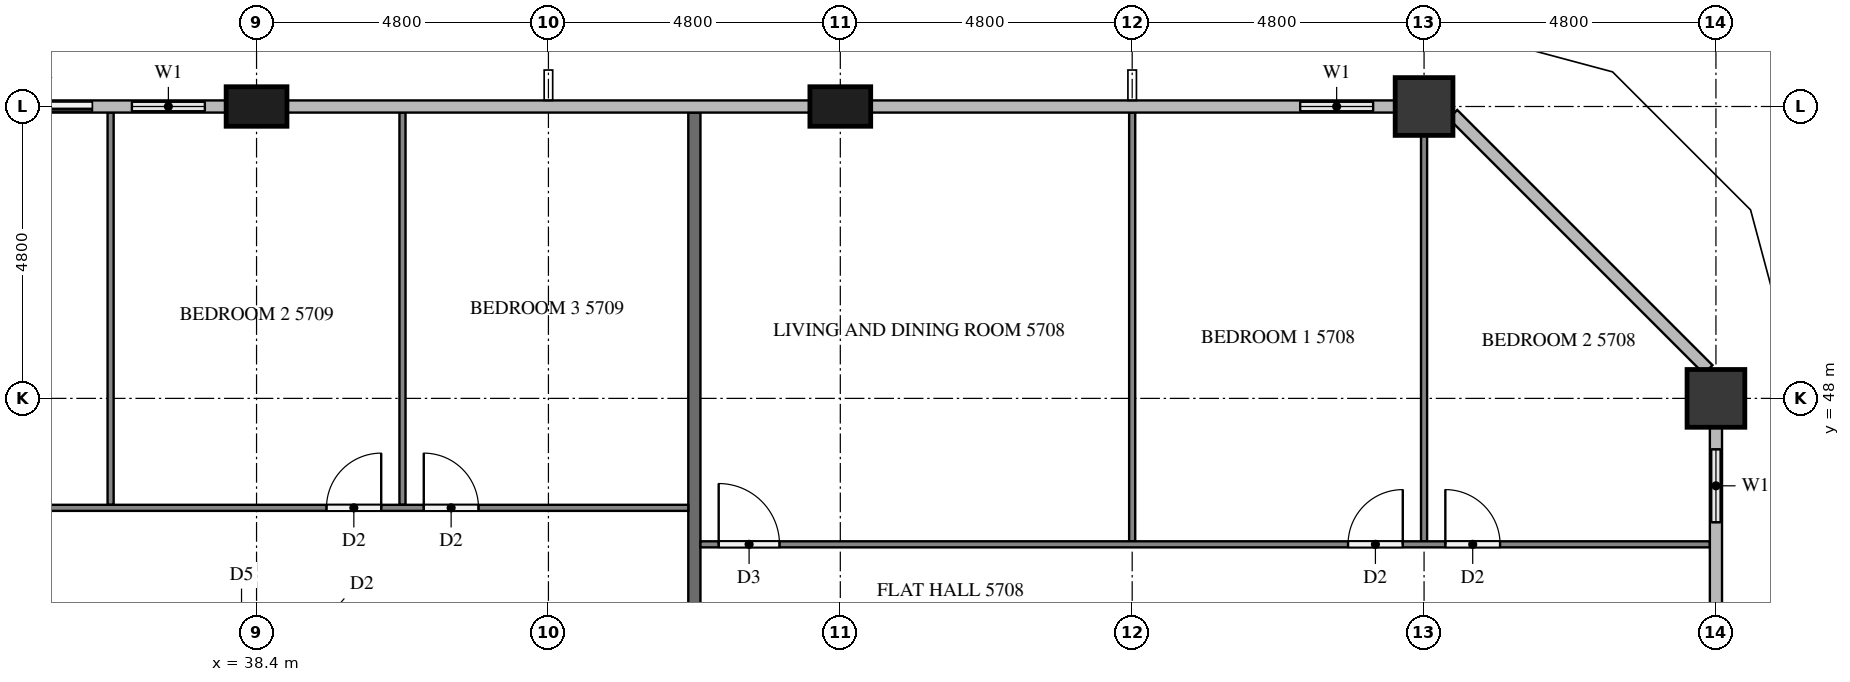
"""IFC4 building model, lengths in metres.
Left out: names, types, materials, properties, quantities, classifications, styles, units other than length and angle.
Written with IfcOpenShell. Run it as: python <this file> out.ifc"""

import sys

from ifc_helpers import new_model, si_unit, direction, frame, frame_2d, origin, origin_2d, place, context, subcontext, project, spatial, rectangle, extrude, element, fill, save


model = new_model("IFC4")
c1 = context("Model", 3, precision=1e-05, world=origin(), true_north=direction((0.0, 1.0)))
c2 = subcontext(c1, "Body", "Model", "MODEL_VIEW")
j1 = project(units=[si_unit("LENGTHUNIT", "METRE"), si_unit("PLANEANGLEUNIT", "RADIAN")], contexts=[c1])
p1 = place(None, origin())
s1 = spatial("IfcSite", under=j1, at=p1, CompositionType="ELEMENT")
p2 = place(p1, origin())
s2 = spatial("IfcBuilding", under=s1, at=p2, CompositionType="ELEMENT")
p3 = place(p2, frame((0.0, 0.0, 219.3)))
s3 = spatial("IfcBuildingStorey", under=s2, at=p3, CompositionType="ELEMENT", Elevation=219.3)
for number, where, z_axis, x_axis in (
    (1, (62.4, 48.0, 0.0), (0.0, 0.0, 1.0), (1.0, 0.0, 0.0)),
    (2, (57.6, 52.8, 0.0), (0.0, 0.0, 1.0), (1.0, 0.0, 0.0)),
):
    element("IfcColumn", number, at=place(p3, frame(where, z_axis=z_axis, x_axis=x_axis)), inside=s3, PredefinedType="COLUMN", context=c2, shape_type="SweptSolid", body=[
        extrude(rectangle(XDim=0.95, YDim=0.95, at=origin_2d()), origin(), (0.0, 0.0, 1.0), 3.2),
    ])
for number, where, z_axis, x_axis in (
    (3, (48.0, 52.8, 0.0), (0.0, 0.0, 1.0), (1.0, 0.0, 0.0)),
    (4, (38.4, 52.8, 0.0), (0.0, 0.0, 1.0), (1.0, 0.0, 0.0)),
):
    element("IfcColumn", number, at=place(p3, frame(where, z_axis=z_axis, x_axis=x_axis)), inside=s3, PredefinedType="COLUMN", context=c2, shape_type="SweptSolid", body=[
        extrude(rectangle(XDim=1.0, YDim=0.65, at=origin_2d()), origin(), (0.0, 0.0, 1.0), 3.2),
    ])
p4 = place(p3, frame((62.4, 45.6, 0.0), z_axis=(0.0, 0.0, 1.0), x_axis=(0.0, 1.0, 0.0)))
e5 = element("IfcWall", 5, at=p4, inside=s3, PredefinedType="SOLIDWALL", context=c2, shape_type="SweptSolid", body=[
    extrude(rectangle(XDim=1.925, YDim=0.15, at=frame_2d((0.962, 0.0))), origin(), (0.0, 0.0, 1.0), 3.2),
])
p5 = place(p4, frame((0.363, 0.0, 0.9)))
e6 = element("IfcOpeningElement", 6, at=p5, cuts=e5, PredefinedType="OPENING", context=c2, shape_type="SweptSolid", body=[
    extrude(rectangle(XDim=1.2, YDim=1.4, at=frame_2d((0.6, 0.7))), frame((0.0, 0.085, 0.0), z_axis=(0.0, -1.0, 0.0), x_axis=(1.0, 0.0, 0.0)), (0.0, 0.0, 1.0), 0.17),
])
p6 = place(p3, frame((57.125, 52.8, 0.0), z_axis=(0.0, 0.0, 1.0), x_axis=(-1.0, 0.0, 0.0)))
e7 = element("IfcWall", 7, at=p6, inside=s3, PredefinedType="SOLIDWALL", context=c2, shape_type="SweptSolid", body=[
    extrude(rectangle(XDim=1.925, YDim=0.15, at=frame_2d((0.962, 0.0))), origin(), (0.0, 0.0, 1.0), 3.2),
])
p7 = place(p6, frame((0.363, 0.0, 0.9)))
e8 = element("IfcOpeningElement", 8, at=p7, cuts=e7, PredefinedType="OPENING", context=c2, shape_type="SweptSolid", body=[
    extrude(rectangle(XDim=1.2, YDim=1.4, at=frame_2d((0.6, 0.7))), frame((0.0, 0.085, 0.0), z_axis=(0.0, -1.0, 0.0), x_axis=(1.0, 0.0, 0.0)), (0.0, 0.0, 1.0), 0.17),
])
p8 = place(p3, frame((37.9, 52.8, 0.0), z_axis=(0.0, 0.0, 1.0), x_axis=(-1.0, 0.0, 0.0)))
e9 = element("IfcWall", 9, at=p8, inside=s3, PredefinedType="SOLIDWALL", context=c2, shape_type="SweptSolid", body=[
    extrude(rectangle(XDim=4.3, YDim=0.15, at=frame_2d((2.15, 0.0))), origin(), (0.0, 0.0, 1.0), 3.2),
])
p9 = place(p8, frame((0.35, 0.0, 0.9)))
e10 = element("IfcOpeningElement", 10, at=p9, cuts=e9, PredefinedType="OPENING", context=c2, shape_type="SweptSolid", body=[
    extrude(rectangle(XDim=1.2, YDim=1.4, at=frame_2d((0.6, 0.7))), frame((0.0, 0.085, 0.0), z_axis=(0.0, -1.0, 0.0), x_axis=(1.0, 0.0, 0.0)), (0.0, 0.0, 1.0), 0.17),
])
p10 = place(p8, frame((2.2, 0.0, 0.0)))
e11 = element("IfcOpeningElement", 11, at=p10, cuts=e9, PredefinedType="OPENING", context=c2, shape_type="SweptSolid", body=[
    extrude(rectangle(XDim=1.8, YDim=2.4, at=frame_2d((0.9, 1.2))), frame((0.0, 0.085, 0.0), z_axis=(0.0, -1.0, 0.0), x_axis=(1.0, 0.0, 0.0)), (0.0, 0.0, 1.0), 0.17),
])
p11 = place(p3, frame((45.6, 52.7, 0.0), z_axis=(0.0, 0.0, 1.0), x_axis=(0.0, -1.0, 0.0)))
e12 = element("IfcWall", 12, at=p11, inside=s3, PredefinedType="PARTITIONING", context=c2, shape_type="SweptSolid", body=[
    extrude(rectangle(XDim=11.8, YDim=0.2, at=frame_2d((5.9, 0.0))), origin(), (0.0, 0.0, 1.0), 3.2),
])
p12 = place(p3, frame((52.8, 45.65, 0.0), z_axis=(0.0, 0.0, 1.0), x_axis=(0.0, 1.0, 0.0)))
e13 = element("IfcWall", 13, at=p12, inside=s3, PredefinedType="PARTITIONING", context=c2, shape_type="SweptSolid", body=[
    extrude(rectangle(XDim=7.05, YDim=0.1, at=frame_2d((3.525, 0.0))), origin(), (0.0, 0.0, 1.0), 3.2),
])
p13 = place(p3, frame((57.6, 45.65, 0.0), z_axis=(0.0, 0.0, 1.0), x_axis=(0.0, 1.0, 0.0)))
e14 = element("IfcWall", 14, at=p13, inside=s3, PredefinedType="PARTITIONING", context=c2, shape_type="SweptSolid", body=[
    extrude(rectangle(XDim=6.675, YDim=0.1, at=frame_2d((3.337, 0.0))), origin(), (0.0, 0.0, 1.0), 3.2),
])
p14 = place(p3, frame((45.7, 45.6, 0.0), z_axis=(0.0, 0.0, 1.0), x_axis=(1.0, 0.0, 0.0)))
e15 = element("IfcWall", 15, at=p14, inside=s3, PredefinedType="PARTITIONING", context=c2, shape_type="SweptSolid", body=[
    extrude(rectangle(XDim=16.6, YDim=0.1, at=frame_2d((8.3, 0.0))), origin(), (0.0, 0.0, 1.0), 3.2),
])
p15 = place(p14, frame((0.3, 0.0, 0.0)))
e16 = element("IfcOpeningElement", 16, at=p15, cuts=e15, PredefinedType="OPENING", context=c2, shape_type="SweptSolid", body=[
    extrude(rectangle(XDim=1.0, YDim=2.1, at=frame_2d((0.5, 1.05))), frame((0.0, 0.06, 0.0), z_axis=(0.0, -1.0, 0.0), x_axis=(1.0, 0.0, 0.0)), (0.0, 0.0, 1.0), 0.12),
])
p16 = place(p14, frame((10.65, 0.0, 0.0)))
e17 = element("IfcOpeningElement", 17, at=p16, cuts=e15, PredefinedType="OPENING", context=c2, shape_type="SweptSolid", body=[
    extrude(rectangle(XDim=0.9, YDim=2.1, at=frame_2d((0.45, 1.05))), frame((0.0, 0.06, 0.0), z_axis=(0.0, -1.0, 0.0), x_axis=(1.0, 0.0, 0.0)), (0.0, 0.0, 1.0), 0.12),
])
p17 = place(p14, frame((12.25, 0.0, 0.0)))
e18 = element("IfcOpeningElement", 18, at=p17, cuts=e15, PredefinedType="OPENING", context=c2, shape_type="SweptSolid", body=[
    extrude(rectangle(XDim=0.9, YDim=2.1, at=frame_2d((0.45, 1.05))), frame((0.0, 0.06, 0.0), z_axis=(0.0, -1.0, 0.0), x_axis=(1.0, 0.0, 0.0)), (0.0, 0.0, 1.0), 0.12),
])
for number, where, z_axis, x_axis in (
    (19, (36.0, 46.25, 0.0), (0.0, 0.0, 1.0), (0.0, 1.0, 0.0)),
    (20, (40.8, 46.25, 0.0), (0.0, 0.0, 1.0), (0.0, 1.0, 0.0)),
):
    element("IfcWall", number, at=place(p3, frame(where, z_axis=z_axis, x_axis=x_axis)), inside=s3, PredefinedType="PARTITIONING", context=c2, shape_type="SweptSolid", body=[
        extrude(rectangle(XDim=6.45, YDim=0.1, at=frame_2d((3.225, 0.0))), origin(), (0.0, 0.0, 1.0), 3.2),
    ])
p18 = place(p3, frame((26.5, 46.2, 0.0), z_axis=(0.0, 0.0, 1.0), x_axis=(1.0, 0.0, 0.0)))
e21 = element("IfcWall", 21, at=p18, inside=s3, PredefinedType="PARTITIONING", context=c2, shape_type="SweptSolid", body=[
    extrude(rectangle(XDim=19.0, YDim=0.1, at=frame_2d((9.5, 0.0))), origin(), (0.0, 0.0, 1.0), 3.2),
])
p19 = place(p18, frame((3.45, 0.0, 0.0)))
e22 = element("IfcOpeningElement", 22, at=p19, cuts=e21, PredefinedType="OPENING", context=c2, shape_type="SweptSolid", body=[
    extrude(rectangle(XDim=0.9, YDim=2.1, at=frame_2d((0.45, 1.05))), frame((0.0, 0.06, 0.0), z_axis=(0.0, -1.0, 0.0), x_axis=(1.0, 0.0, 0.0)), (0.0, 0.0, 1.0), 0.12),
])
p20 = place(p18, frame((5.05, 0.0, 0.0)))
e23 = element("IfcOpeningElement", 23, at=p20, cuts=e21, PredefinedType="OPENING", context=c2, shape_type="SweptSolid", body=[
    extrude(rectangle(XDim=1.0, YDim=2.1, at=frame_2d((0.5, 1.05))), frame((0.0, 0.06, 0.0), z_axis=(0.0, -1.0, 0.0), x_axis=(1.0, 0.0, 0.0)), (0.0, 0.0, 1.0), 0.12),
])
p21 = place(p18, frame((13.05, 0.0, 0.0)))
e24 = element("IfcOpeningElement", 24, at=p21, cuts=e21, PredefinedType="OPENING", context=c2, shape_type="SweptSolid", body=[
    extrude(rectangle(XDim=0.9, YDim=2.1, at=frame_2d((0.45, 1.05))), frame((0.0, 0.06, 0.0), z_axis=(0.0, -1.0, 0.0), x_axis=(1.0, 0.0, 0.0)), (0.0, 0.0, 1.0), 0.12),
])
p22 = place(p18, frame((14.65, 0.0, 0.0)))
e25 = element("IfcOpeningElement", 25, at=p22, cuts=e21, PredefinedType="OPENING", context=c2, shape_type="SweptSolid", body=[
    extrude(rectangle(XDim=0.9, YDim=2.1, at=frame_2d((0.45, 1.05))), frame((0.0, 0.06, 0.0), z_axis=(0.0, -1.0, 0.0), x_axis=(1.0, 0.0, 0.0)), (0.0, 0.0, 1.0), 0.12),
])
p23 = place(p5, origin())
e26 = element("IfcWindow", 26, at=p23, inside=s3, PartitioningType="SINGLE_PANEL", PredefinedType="WINDOW", context=c2, shape_type="SweptSolid", body=[
    extrude(rectangle(XDim=1.2, YDim=1.4, at=frame_2d((0.6, 0.7))), frame((0.0, 0.03, 0.0), z_axis=(0.0, -1.0, 0.0), x_axis=(1.0, 0.0, 0.0)), (0.0, 0.0, 1.0), 0.06),
])
fill(e6, e26)
p24 = place(p7, origin())
e27 = element("IfcWindow", 27, at=p24, inside=s3, PartitioningType="SINGLE_PANEL", PredefinedType="WINDOW", context=c2, shape_type="SweptSolid", body=[
    extrude(rectangle(XDim=1.2, YDim=1.4, at=frame_2d((0.6, 0.7))), frame((0.0, 0.03, 0.0), z_axis=(0.0, -1.0, 0.0), x_axis=(1.0, 0.0, 0.0)), (0.0, 0.0, 1.0), 0.06),
])
fill(e8, e27)
p25 = place(p9, origin())
e28 = element("IfcWindow", 28, at=p25, inside=s3, PartitioningType="SINGLE_PANEL", PredefinedType="WINDOW", context=c2, shape_type="SweptSolid", body=[
    extrude(rectangle(XDim=1.2, YDim=1.4, at=frame_2d((0.6, 0.7))), frame((0.0, 0.03, 0.0), z_axis=(0.0, -1.0, 0.0), x_axis=(1.0, 0.0, 0.0)), (0.0, 0.0, 1.0), 0.06),
])
fill(e10, e28)
p26 = place(p10, origin())
e29 = element("IfcDoor", 29, at=p26, inside=s3, OperationType="SLIDING_TO_LEFT", PredefinedType="DOOR", context=c2, shape_type="SweptSolid", body=[
    extrude(rectangle(XDim=1.8, YDim=2.4, at=frame_2d((0.9, 1.2))), frame((0.0, 0.025, 0.0), z_axis=(0.0, -1.0, 0.0), x_axis=(1.0, 0.0, 0.0)), (0.0, 0.0, 1.0), 0.05),
])
fill(e11, e29)
p27 = place(p15, origin())
e30 = element("IfcDoor", 30, at=p27, inside=s3, OperationType="SINGLE_SWING_LEFT", PredefinedType="DOOR", context=c2, shape_type="SweptSolid", body=[
    extrude(rectangle(XDim=1.0, YDim=2.1, at=frame_2d((0.5, 1.05))), frame((0.0, 0.025, 0.0), z_axis=(0.0, -1.0, 0.0), x_axis=(1.0, 0.0, 0.0)), (0.0, 0.0, 1.0), 0.05),
])
fill(e16, e30)
p28 = place(p16, origin())
e31 = element("IfcDoor", 31, at=p28, inside=s3, OperationType="SINGLE_SWING_RIGHT", PredefinedType="DOOR", context=c2, shape_type="SweptSolid", body=[
    extrude(rectangle(XDim=0.9, YDim=2.1, at=frame_2d((0.45, 1.05))), frame((0.0, 0.025, 0.0), z_axis=(0.0, -1.0, 0.0), x_axis=(1.0, 0.0, 0.0)), (0.0, 0.0, 1.0), 0.05),
])
fill(e17, e31)
p29 = place(p17, origin())
e32 = element("IfcDoor", 32, at=p29, inside=s3, OperationType="SINGLE_SWING_LEFT", PredefinedType="DOOR", context=c2, shape_type="SweptSolid", body=[
    extrude(rectangle(XDim=0.9, YDim=2.1, at=frame_2d((0.45, 1.05))), frame((0.0, 0.025, 0.0), z_axis=(0.0, -1.0, 0.0), x_axis=(1.0, 0.0, 0.0)), (0.0, 0.0, 1.0), 0.05),
])
fill(e18, e32)
p30 = place(p21, origin())
e33 = element("IfcDoor", 33, at=p30, inside=s3, OperationType="SINGLE_SWING_RIGHT", PredefinedType="DOOR", context=c2, shape_type="SweptSolid", body=[
    extrude(rectangle(XDim=0.9, YDim=2.1, at=frame_2d((0.45, 1.05))), frame((0.0, 0.025, 0.0), z_axis=(0.0, -1.0, 0.0), x_axis=(1.0, 0.0, 0.0)), (0.0, 0.0, 1.0), 0.05),
])
fill(e24, e33)
p31 = place(p22, origin())
e34 = element("IfcDoor", 34, at=p31, inside=s3, OperationType="SINGLE_SWING_LEFT", PredefinedType="DOOR", context=c2, shape_type="SweptSolid", body=[
    extrude(rectangle(XDim=0.9, YDim=2.1, at=frame_2d((0.45, 1.05))), frame((0.0, 0.025, 0.0), z_axis=(0.0, -1.0, 0.0), x_axis=(1.0, 0.0, 0.0)), (0.0, 0.0, 1.0), 0.05),
])
fill(e25, e34)
save(model, sys.argv[1])
